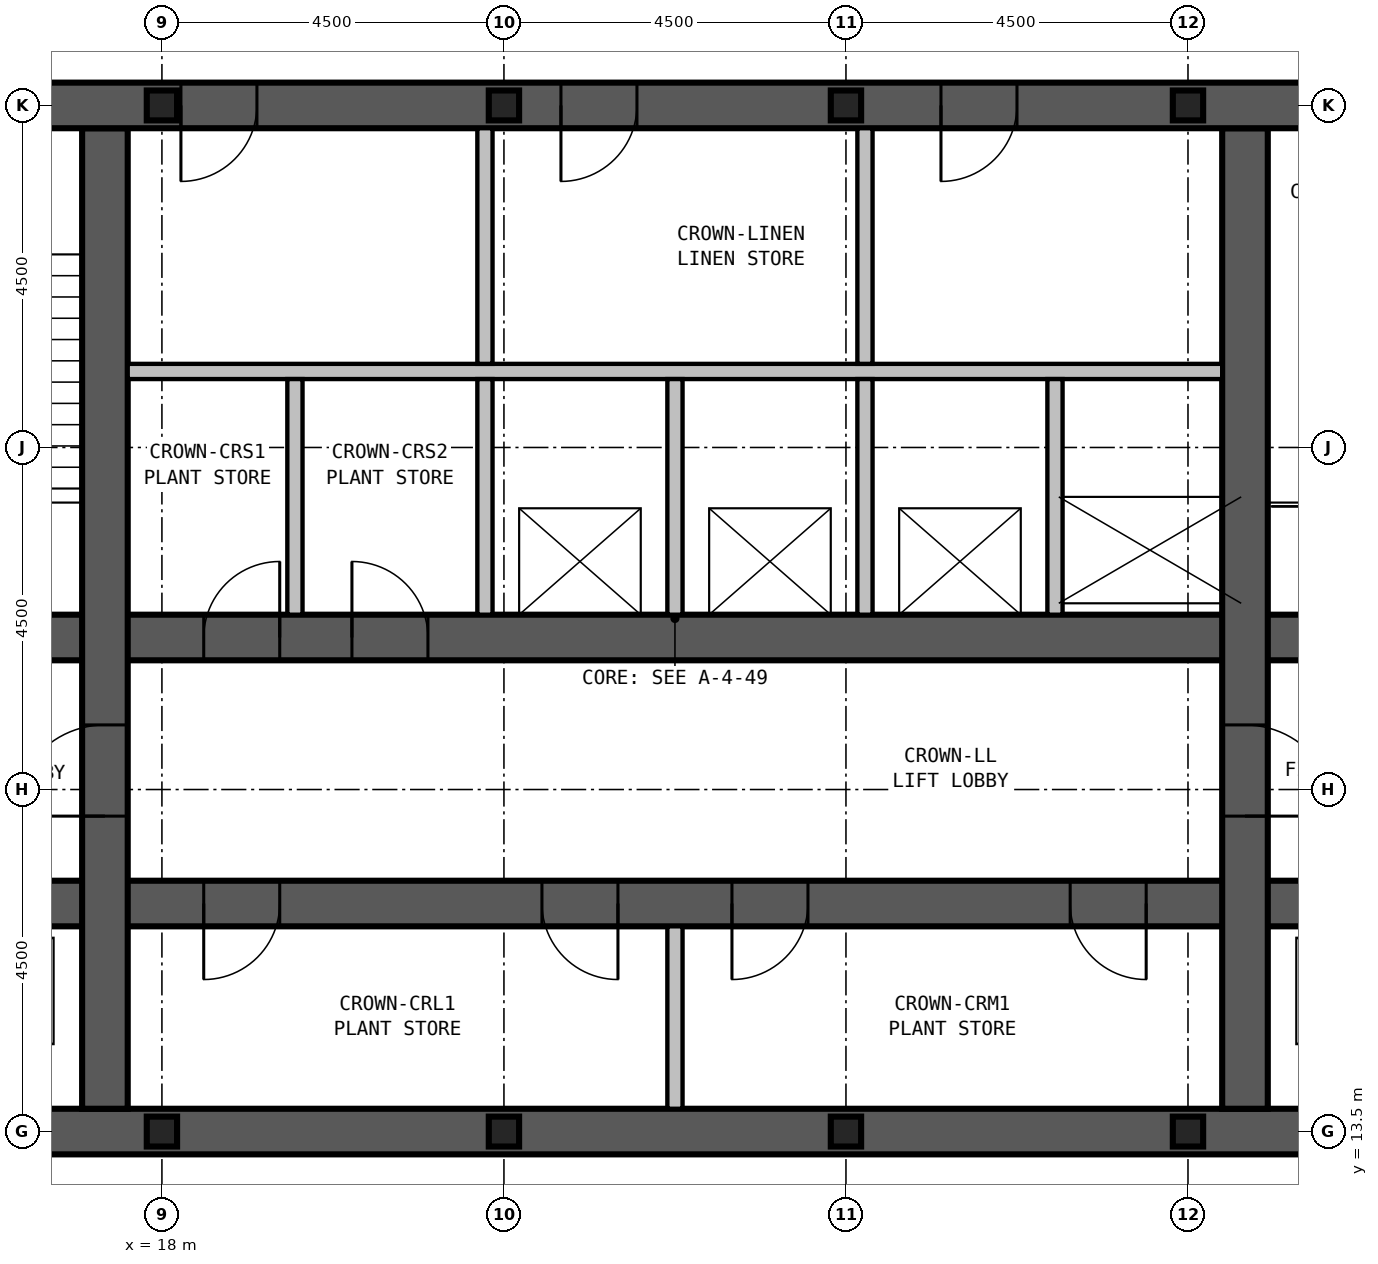
"""IFC4 building model, lengths in metres.
Left out: names, types, materials, properties, quantities, classifications, styles, units other than length and angle.
Written with IfcOpenShell. Run it as: python <this file> out.ifc"""

import sys

from ifc_helpers import new_model, si_unit, direction, frame, frame_2d, origin, origin_2d, place, context, subcontext, project, spatial, rectangle, i_section, extrude, element, fill, save


model = new_model("IFC4")
c1 = context("Model", 3, precision=1e-05, world=origin(), true_north=direction((0.0, 1.0)))
c2 = subcontext(c1, "Body", "Model", "MODEL_VIEW")
j1 = project(units=[si_unit("LENGTHUNIT", "METRE"), si_unit("PLANEANGLEUNIT", "RADIAN")], contexts=[c1])
p1 = place(None, origin())
s1 = spatial("IfcSite", under=j1, at=p1, CompositionType="ELEMENT")
p2 = place(p1, origin())
s2 = spatial("IfcBuilding", under=s1, at=p2, CompositionType="ELEMENT")
p3 = place(p2, frame((0.0, 0.0, 289.7)))
s3 = spatial("IfcBuildingStorey", under=s2, at=p3, CompositionType="ELEMENT", Elevation=289.7)
p4 = place(p3, frame((13.2, 13.5, 0.0), z_axis=(0.0, 0.0, 1.0), x_axis=(1.0, 0.0, 0.0)))
e1 = element("IfcWall", 1, at=p4, inside=s3, PredefinedType="SHEAR", context=c2, shape_type="SweptSolid", body=[
    extrude(rectangle(XDim=23.1, YDim=0.6, at=frame_2d((11.55, 0.0))), origin(), (0.0, 0.0, 1.0), 4.0),
])
p5 = place(p3, frame((36.3, 27.0, 0.0), z_axis=(0.0, 0.0, 1.0), x_axis=(-1.0, 0.0, 0.0)))
e2 = element("IfcWall", 2, at=p5, inside=s3, PredefinedType="SHEAR", context=c2, shape_type="SweptSolid", body=[
    extrude(rectangle(XDim=23.6, YDim=0.6, at=frame_2d((11.8, 0.0))), origin(), (0.0, 0.0, 1.0), 4.0),
])
p6 = place(p5, frame((17.05, 0.0, 0.0)))
e3 = element("IfcOpeningElement", 3, at=p6, cuts=e2, PredefinedType="OPENING", context=c2, shape_type="SweptSolid", body=[
    extrude(rectangle(XDim=1.0, YDim=2.1, at=frame_2d((0.5, 1.05))), frame((0.0, 0.31, 0.0), z_axis=(0.0, -1.0, 0.0), x_axis=(1.0, 0.0, 0.0)), (0.0, 0.0, 1.0), 0.62),
])
p7 = place(p5, frame((12.05, 0.0, 0.0)))
e4 = element("IfcOpeningElement", 4, at=p7, cuts=e2, PredefinedType="OPENING", context=c2, shape_type="SweptSolid", body=[
    extrude(rectangle(XDim=1.0, YDim=2.1, at=frame_2d((0.5, 1.05))), frame((0.0, 0.31, 0.0), z_axis=(0.0, -1.0, 0.0), x_axis=(1.0, 0.0, 0.0)), (0.0, 0.0, 1.0), 0.62),
])
p8 = place(p5, frame((7.05, 0.0, 0.0)))
e5 = element("IfcOpeningElement", 5, at=p8, cuts=e2, PredefinedType="OPENING", context=c2, shape_type="SweptSolid", body=[
    extrude(rectangle(XDim=1.0, YDim=2.1, at=frame_2d((0.5, 1.05))), frame((0.0, 0.31, 0.0), z_axis=(0.0, -1.0, 0.0), x_axis=(1.0, 0.0, 0.0)), (0.0, 0.0, 1.0), 0.62),
])
p9 = place(p3, frame((17.25, 13.8, 0.0), z_axis=(0.0, 0.0, 1.0), x_axis=(0.0, 1.0, 0.0)))
e6 = element("IfcWall", 6, at=p9, inside=s3, PredefinedType="SHEAR", context=c2, shape_type="SweptSolid", body=[
    extrude(rectangle(XDim=12.9, YDim=0.6, at=frame_2d((6.45, 0.0))), origin(), (0.0, 0.0, 1.0), 4.0),
])
p10 = place(p9, frame((3.85, 0.0, 0.0)))
e7 = element("IfcOpeningElement", 7, at=p10, cuts=e6, PredefinedType="OPENING", context=c2, shape_type="SweptSolid", body=[
    extrude(rectangle(XDim=1.2, YDim=2.1, at=frame_2d((0.6, 1.05))), frame((0.0, 0.31, 0.0), z_axis=(0.0, -1.0, 0.0), x_axis=(1.0, 0.0, 0.0)), (0.0, 0.0, 1.0), 0.62),
])
p11 = place(p3, frame((32.25, 13.8, 0.0), z_axis=(0.0, 0.0, 1.0), x_axis=(0.0, 1.0, 0.0)))
e8 = element("IfcWall", 8, at=p11, inside=s3, PredefinedType="SHEAR", context=c2, shape_type="SweptSolid", body=[
    extrude(rectangle(XDim=12.9, YDim=0.6, at=frame_2d((6.45, 0.0))), origin(), (0.0, 0.0, 1.0), 4.0),
])
p12 = place(p11, frame((5.05, 0.0, 0.0), z_axis=(0.0, 0.0, 1.0), x_axis=(-1.0, 0.0, 0.0)))
e9 = element("IfcOpeningElement", 9, at=p12, cuts=e8, PredefinedType="OPENING", context=c2, shape_type="SweptSolid", body=[
    extrude(rectangle(XDim=1.2, YDim=2.1, at=frame_2d((0.6, 1.05))), frame((0.0, 0.31, 0.0), z_axis=(0.0, -1.0, 0.0), x_axis=(1.0, 0.0, 0.0)), (0.0, 0.0, 1.0), 0.62),
])
p13 = place(p3, frame((13.8, 16.5, 0.0), z_axis=(0.0, 0.0, 1.0), x_axis=(1.0, 0.0, 0.0)))
e10 = element("IfcWall", 10, at=p13, inside=s3, PredefinedType="SHEAR", context=c2, shape_type="SweptSolid", body=[
    extrude(rectangle(XDim=21.9, YDim=0.6, at=frame_2d((10.95, 0.0))), origin(), (0.0, 0.0, 1.0), 4.0),
])
p14 = place(p13, frame((5.75, 0.0, 0.0), z_axis=(0.0, 0.0, 1.0), x_axis=(-1.0, 0.0, 0.0)))
e11 = element("IfcOpeningElement", 11, at=p14, cuts=e10, PredefinedType="OPENING", context=c2, shape_type="SweptSolid", body=[
    extrude(rectangle(XDim=1.0, YDim=2.1, at=frame_2d((0.5, 1.05))), frame((0.0, 0.31, 0.0), z_axis=(0.0, -1.0, 0.0), x_axis=(1.0, 0.0, 0.0)), (0.0, 0.0, 1.0), 0.62),
])
p15 = place(p13, frame((10.2, 0.0, 0.0), z_axis=(0.0, 0.0, 1.0), x_axis=(-1.0, 0.0, 0.0)))
e12 = element("IfcOpeningElement", 12, at=p15, cuts=e10, PredefinedType="OPENING", context=c2, shape_type="SweptSolid", body=[
    extrude(rectangle(XDim=1.0, YDim=2.1, at=frame_2d((0.5, 1.05))), frame((0.0, 0.31, 0.0), z_axis=(0.0, -1.0, 0.0), x_axis=(1.0, 0.0, 0.0)), (0.0, 0.0, 1.0), 0.62),
])
p16 = place(p13, frame((12.7, 0.0, 0.0), z_axis=(0.0, 0.0, 1.0), x_axis=(-1.0, 0.0, 0.0)))
e13 = element("IfcOpeningElement", 13, at=p16, cuts=e10, PredefinedType="OPENING", context=c2, shape_type="SweptSolid", body=[
    extrude(rectangle(XDim=1.0, YDim=2.1, at=frame_2d((0.5, 1.05))), frame((0.0, 0.31, 0.0), z_axis=(0.0, -1.0, 0.0), x_axis=(1.0, 0.0, 0.0)), (0.0, 0.0, 1.0), 0.62),
])
p17 = place(p13, frame((17.15, 0.0, 0.0), z_axis=(0.0, 0.0, 1.0), x_axis=(-1.0, 0.0, 0.0)))
e14 = element("IfcOpeningElement", 14, at=p17, cuts=e10, PredefinedType="OPENING", context=c2, shape_type="SweptSolid", body=[
    extrude(rectangle(XDim=1.0, YDim=2.1, at=frame_2d((0.5, 1.05))), frame((0.0, 0.31, 0.0), z_axis=(0.0, -1.0, 0.0), x_axis=(1.0, 0.0, 0.0)), (0.0, 0.0, 1.0), 0.62),
])
p18 = place(p13, frame((0.6, 0.0, 0.0)))
e15 = element("IfcOpeningElement", 15, at=p18, cuts=e10, PredefinedType="OPENING", context=c2, shape_type="SweptSolid", body=[
    extrude(rectangle(XDim=1.2, YDim=2.1, at=frame_2d((0.6, 1.05))), frame((0.0, 0.31, 0.0), z_axis=(0.0, -1.0, 0.0), x_axis=(1.0, 0.0, 0.0)), (0.0, 0.0, 1.0), 0.62),
])
p19 = place(p13, frame((19.6, 0.0, 0.0)))
e16 = element("IfcOpeningElement", 16, at=p19, cuts=e10, PredefinedType="OPENING", context=c2, shape_type="SweptSolid", body=[
    extrude(rectangle(XDim=1.2, YDim=2.1, at=frame_2d((0.6, 1.05))), frame((0.0, 0.31, 0.0), z_axis=(0.0, -1.0, 0.0), x_axis=(1.0, 0.0, 0.0)), (0.0, 0.0, 1.0), 0.62),
])
p20 = place(p3, frame((13.8, 20.0, 0.0), z_axis=(0.0, 0.0, 1.0), x_axis=(1.0, 0.0, 0.0)))
e17 = element("IfcWall", 17, at=p20, inside=s3, PredefinedType="SHEAR", context=c2, shape_type="SweptSolid", body=[
    extrude(rectangle(XDim=21.9, YDim=0.6, at=frame_2d((10.95, 0.0))), origin(), (0.0, 0.0, 1.0), 4.0),
])
p21 = place(p20, frame((0.5, 0.0, 0.0)))
e18 = element("IfcOpeningElement", 18, at=p21, cuts=e17, PredefinedType="OPENING", context=c2, shape_type="SweptSolid", body=[
    extrude(rectangle(XDim=1.0, YDim=2.1, at=frame_2d((0.5, 1.05))), frame((0.0, 0.31, 0.0), z_axis=(0.0, -1.0, 0.0), x_axis=(1.0, 0.0, 0.0)), (0.0, 0.0, 1.0), 0.62),
])
p22 = place(p20, frame((20.5, 0.0, 0.0)))
e19 = element("IfcOpeningElement", 19, at=p22, cuts=e17, PredefinedType="OPENING", context=c2, shape_type="SweptSolid", body=[
    extrude(rectangle(XDim=1.0, YDim=2.1, at=frame_2d((0.5, 1.05))), frame((0.0, 0.31, 0.0), z_axis=(0.0, -1.0, 0.0), x_axis=(1.0, 0.0, 0.0)), (0.0, 0.0, 1.0), 0.62),
])
p23 = place(p20, frame((4.75, 0.0, 0.0)))
e20 = element("IfcOpeningElement", 20, at=p23, cuts=e17, PredefinedType="OPENING", context=c2, shape_type="SweptSolid", body=[
    extrude(rectangle(XDim=1.0, YDim=2.1, at=frame_2d((0.5, 1.05))), frame((0.0, 0.31, 0.0), z_axis=(0.0, -1.0, 0.0), x_axis=(1.0, 0.0, 0.0)), (0.0, 0.0, 1.0), 0.62),
])
p24 = place(p20, frame((6.7, 0.0, 0.0)))
e21 = element("IfcOpeningElement", 21, at=p24, cuts=e17, PredefinedType="OPENING", context=c2, shape_type="SweptSolid", body=[
    extrude(rectangle(XDim=1.0, YDim=2.1, at=frame_2d((0.5, 1.05))), frame((0.0, 0.31, 0.0), z_axis=(0.0, -1.0, 0.0), x_axis=(1.0, 0.0, 0.0)), (0.0, 0.0, 1.0), 0.62),
])
p25 = place(p3, frame((18.0, 13.5, 4.0), z_axis=(0.0, 0.0, 1.0), x_axis=(1.0, 0.0, 0.0)))
e22 = element("IfcColumn", 22, at=p25, inside=s3, PredefinedType="COLUMN", context=c2, shape_type="SweptSolid", body=[
    extrude(i_section(OverallWidth=0.399, OverallDepth=0.394, WebThickness=0.023, FlangeThickness=0.037, FilletRadius=0.015, at=origin_2d()), origin(), (0.0, 0.0, 1.0), 1.95),
])
p26 = place(p3, frame((22.5, 13.5, 4.0), z_axis=(0.0, 0.0, 1.0), x_axis=(1.0, 0.0, 0.0)))
e23 = element("IfcColumn", 23, at=p26, inside=s3, PredefinedType="COLUMN", context=c2, shape_type="SweptSolid", body=[
    extrude(i_section(OverallWidth=0.399, OverallDepth=0.394, WebThickness=0.023, FlangeThickness=0.037, FilletRadius=0.015, at=origin_2d()), origin(), (0.0, 0.0, 1.0), 3.39),
])
p27 = place(p3, frame((27.0, 13.5, 4.0), z_axis=(0.0, 0.0, 1.0), x_axis=(1.0, 0.0, 0.0)))
e24 = element("IfcColumn", 24, at=p27, inside=s3, PredefinedType="COLUMN", context=c2, shape_type="SweptSolid", body=[
    extrude(i_section(OverallWidth=0.399, OverallDepth=0.394, WebThickness=0.023, FlangeThickness=0.037, FilletRadius=0.015, at=origin_2d()), origin(), (0.0, 0.0, 1.0), 4.83),
])
p28 = place(p3, frame((31.5, 13.5, 4.0), z_axis=(0.0, 0.0, 1.0), x_axis=(1.0, 0.0, 0.0)))
e25 = element("IfcColumn", 25, at=p28, inside=s3, PredefinedType="COLUMN", context=c2, shape_type="SweptSolid", body=[
    extrude(i_section(OverallWidth=0.399, OverallDepth=0.394, WebThickness=0.023, FlangeThickness=0.037, FilletRadius=0.015, at=origin_2d()), origin(), (0.0, 0.0, 1.0), 6.27),
])
p29 = place(p3, frame((18.0, 27.0, 4.0), z_axis=(0.0, 0.0, 1.0), x_axis=(1.0, 0.0, 0.0)))
e26 = element("IfcColumn", 26, at=p29, inside=s3, PredefinedType="COLUMN", context=c2, shape_type="SweptSolid", body=[
    extrude(i_section(OverallWidth=0.399, OverallDepth=0.394, WebThickness=0.023, FlangeThickness=0.037, FilletRadius=0.015, at=origin_2d()), origin(), (0.0, 0.0, 1.0), 5.73),
])
p30 = place(p3, frame((22.5, 27.0, 4.0), z_axis=(0.0, 0.0, 1.0), x_axis=(1.0, 0.0, 0.0)))
e27 = element("IfcColumn", 27, at=p30, inside=s3, PredefinedType="COLUMN", context=c2, shape_type="SweptSolid", body=[
    extrude(i_section(OverallWidth=0.399, OverallDepth=0.394, WebThickness=0.023, FlangeThickness=0.037, FilletRadius=0.015, at=origin_2d()), origin(), (0.0, 0.0, 1.0), 7.17),
])
p31 = place(p3, frame((27.0, 27.0, 4.0), z_axis=(0.0, 0.0, 1.0), x_axis=(1.0, 0.0, 0.0)))
e28 = element("IfcColumn", 28, at=p31, inside=s3, PredefinedType="COLUMN", context=c2, shape_type="SweptSolid", body=[
    extrude(i_section(OverallWidth=0.399, OverallDepth=0.394, WebThickness=0.023, FlangeThickness=0.037, FilletRadius=0.015, at=origin_2d()), origin(), (0.0, 0.0, 1.0), 8.61),
])
p32 = place(p3, frame((31.5, 27.0, 4.0), z_axis=(0.0, 0.0, 1.0), x_axis=(1.0, 0.0, 0.0)))
e29 = element("IfcColumn", 29, at=p32, inside=s3, PredefinedType="COLUMN", context=c2, shape_type="SweptSolid", body=[
    extrude(i_section(OverallWidth=0.399, OverallDepth=0.394, WebThickness=0.023, FlangeThickness=0.037, FilletRadius=0.015, at=origin_2d()), origin(), (0.0, 0.0, 1.0), 10.05),
])
for number, where, z_axis, x_axis in (
    (30, (19.75, 20.3, 0.0), (0.0, 0.0, 1.0), (0.0, 1.0, 0.0)),
    (31, (22.25, 20.3, 0.0), (0.0, 0.0, 1.0), (0.0, 1.0, 0.0)),
):
    element("IfcWall", number, at=place(p3, frame(where, z_axis=z_axis, x_axis=x_axis)), inside=s3, PredefinedType="PARTITIONING", context=c2, shape_type="SweptSolid", body=[
        extrude(rectangle(XDim=3.1, YDim=0.2, at=frame_2d((1.55, 0.0))), origin(), (0.0, 0.0, 1.0), 4.0),
    ])
p33 = place(p3, frame((24.75, 13.8, 0.0), z_axis=(0.0, 0.0, 1.0), x_axis=(0.0, 1.0, 0.0)))
e32 = element("IfcWall", 32, at=p33, inside=s3, PredefinedType="PARTITIONING", context=c2, shape_type="SweptSolid", body=[
    extrude(rectangle(XDim=2.4, YDim=0.2, at=frame_2d((1.2, 0.0))), origin(), (0.0, 0.0, 1.0), 4.0),
])
for number, where, z_axis, x_axis in (
    (33, (24.75, 20.3, 0.0), (0.0, 0.0, 1.0), (0.0, 1.0, 0.0)),
    (34, (27.25, 20.3, 0.0), (0.0, 0.0, 1.0), (0.0, 1.0, 0.0)),
    (35, (29.75, 20.3, 0.0), (0.0, 0.0, 1.0), (0.0, 1.0, 0.0)),
):
    element("IfcWall", number, at=place(p3, frame(where, z_axis=z_axis, x_axis=x_axis)), inside=s3, PredefinedType="PARTITIONING", context=c2, shape_type="SweptSolid", body=[
        extrude(rectangle(XDim=3.1, YDim=0.2, at=frame_2d((1.55, 0.0))), origin(), (0.0, 0.0, 1.0), 4.0),
    ])
p34 = place(p3, frame((17.55, 23.5, 0.0), z_axis=(0.0, 0.0, 1.0), x_axis=(1.0, 0.0, 0.0)))
e36 = element("IfcWall", 36, at=p34, inside=s3, PredefinedType="PARTITIONING", context=c2, shape_type="SweptSolid", body=[
    extrude(rectangle(XDim=14.4, YDim=0.2, at=frame_2d((7.2, 0.0))), origin(), (0.0, 0.0, 1.0), 4.0),
])
for number, where, z_axis, x_axis in (
    (37, (22.25, 23.6, 0.0), (0.0, 0.0, 1.0), (0.0, 1.0, 0.0)),
    (38, (27.25, 23.6, 0.0), (0.0, 0.0, 1.0), (0.0, 1.0, 0.0)),
):
    element("IfcWall", number, at=place(p3, frame(where, z_axis=z_axis, x_axis=x_axis)), inside=s3, PredefinedType="PARTITIONING", context=c2, shape_type="SweptSolid", body=[
        extrude(rectangle(XDim=3.1, YDim=0.2, at=frame_2d((1.55, 0.0))), origin(), (0.0, 0.0, 1.0), 4.0),
    ])
p35 = place(p10, origin())
e39 = element("IfcDoor", 39, at=p35, inside=s3, OperationType="SINGLE_SWING_LEFT", PredefinedType="DOOR", context=c2, shape_type="SweptSolid", body=[
    extrude(rectangle(XDim=1.2, YDim=2.1, at=frame_2d((0.6, 1.05))), frame((0.0, 0.3, 0.0), z_axis=(0.0, -1.0, 0.0), x_axis=(1.0, 0.0, 0.0)), (0.0, 0.0, 1.0), 0.6),
])
fill(e7, e39)
p36 = place(p12, origin())
e40 = element("IfcDoor", 40, at=p36, inside=s3, OperationType="SINGLE_SWING_RIGHT", PredefinedType="DOOR", context=c2, shape_type="SweptSolid", body=[
    extrude(rectangle(XDim=1.2, YDim=2.1, at=frame_2d((0.6, 1.05))), frame((0.0, 0.3, 0.0), z_axis=(0.0, -1.0, 0.0), x_axis=(1.0, 0.0, 0.0)), (0.0, 0.0, 1.0), 0.6),
])
fill(e9, e40)
p37 = place(p14, origin())
e41 = element("IfcDoor", 41, at=p37, inside=s3, OperationType="SINGLE_SWING_RIGHT", PredefinedType="DOOR", context=c2, shape_type="SweptSolid", body=[
    extrude(rectangle(XDim=1.0, YDim=2.1, at=frame_2d((0.5, 1.05))), frame((0.0, 0.3, 0.0), z_axis=(0.0, -1.0, 0.0), x_axis=(1.0, 0.0, 0.0)), (0.0, 0.0, 1.0), 0.6),
])
fill(e11, e41)
p38 = place(p15, origin())
e42 = element("IfcDoor", 42, at=p38, inside=s3, OperationType="SINGLE_SWING_LEFT", PredefinedType="DOOR", context=c2, shape_type="SweptSolid", body=[
    extrude(rectangle(XDim=1.0, YDim=2.1, at=frame_2d((0.5, 1.05))), frame((0.0, 0.3, 0.0), z_axis=(0.0, -1.0, 0.0), x_axis=(1.0, 0.0, 0.0)), (0.0, 0.0, 1.0), 0.6),
])
fill(e12, e42)
p39 = place(p16, origin())
e43 = element("IfcDoor", 43, at=p39, inside=s3, OperationType="SINGLE_SWING_RIGHT", PredefinedType="DOOR", context=c2, shape_type="SweptSolid", body=[
    extrude(rectangle(XDim=1.0, YDim=2.1, at=frame_2d((0.5, 1.05))), frame((0.0, 0.3, 0.0), z_axis=(0.0, -1.0, 0.0), x_axis=(1.0, 0.0, 0.0)), (0.0, 0.0, 1.0), 0.6),
])
fill(e13, e43)
p40 = place(p17, origin())
e44 = element("IfcDoor", 44, at=p40, inside=s3, OperationType="SINGLE_SWING_LEFT", PredefinedType="DOOR", context=c2, shape_type="SweptSolid", body=[
    extrude(rectangle(XDim=1.0, YDim=2.1, at=frame_2d((0.5, 1.05))), frame((0.0, 0.3, 0.0), z_axis=(0.0, -1.0, 0.0), x_axis=(1.0, 0.0, 0.0)), (0.0, 0.0, 1.0), 0.6),
])
fill(e14, e44)
p41 = place(p23, origin())
e45 = element("IfcDoor", 45, at=p41, inside=s3, OperationType="SINGLE_SWING_RIGHT", PredefinedType="DOOR", context=c2, shape_type="SweptSolid", body=[
    extrude(rectangle(XDim=1.0, YDim=2.1, at=frame_2d((0.5, 1.05))), frame((0.0, 0.3, 0.0), z_axis=(0.0, -1.0, 0.0), x_axis=(1.0, 0.0, 0.0)), (0.0, 0.0, 1.0), 0.6),
])
fill(e20, e45)
p42 = place(p24, origin())
e46 = element("IfcDoor", 46, at=p42, inside=s3, OperationType="SINGLE_SWING_LEFT", PredefinedType="DOOR", context=c2, shape_type="SweptSolid", body=[
    extrude(rectangle(XDim=1.0, YDim=2.1, at=frame_2d((0.5, 1.05))), frame((0.0, 0.3, 0.0), z_axis=(0.0, -1.0, 0.0), x_axis=(1.0, 0.0, 0.0)), (0.0, 0.0, 1.0), 0.6),
])
fill(e21, e46)
p43 = place(p6, origin())
e47 = element("IfcDoor", 47, at=p43, inside=s3, OperationType="SINGLE_SWING_RIGHT", PredefinedType="DOOR", context=c2, shape_type="SweptSolid", body=[
    extrude(rectangle(XDim=1.0, YDim=2.1, at=frame_2d((0.5, 1.05))), frame((0.0, 0.3, 0.0), z_axis=(0.0, -1.0, 0.0), x_axis=(1.0, 0.0, 0.0)), (0.0, 0.0, 1.0), 0.6),
])
fill(e3, e47)
p44 = place(p7, origin())
e48 = element("IfcDoor", 48, at=p44, inside=s3, OperationType="SINGLE_SWING_RIGHT", PredefinedType="DOOR", context=c2, shape_type="SweptSolid", body=[
    extrude(rectangle(XDim=1.0, YDim=2.1, at=frame_2d((0.5, 1.05))), frame((0.0, 0.3, 0.0), z_axis=(0.0, -1.0, 0.0), x_axis=(1.0, 0.0, 0.0)), (0.0, 0.0, 1.0), 0.6),
])
fill(e4, e48)
p45 = place(p8, origin())
e49 = element("IfcDoor", 49, at=p45, inside=s3, OperationType="SINGLE_SWING_RIGHT", PredefinedType="DOOR", context=c2, shape_type="SweptSolid", body=[
    extrude(rectangle(XDim=1.0, YDim=2.1, at=frame_2d((0.5, 1.05))), frame((0.0, 0.3, 0.0), z_axis=(0.0, -1.0, 0.0), x_axis=(1.0, 0.0, 0.0)), (0.0, 0.0, 1.0), 0.6),
])
fill(e5, e49)
save(model, sys.argv[1])
